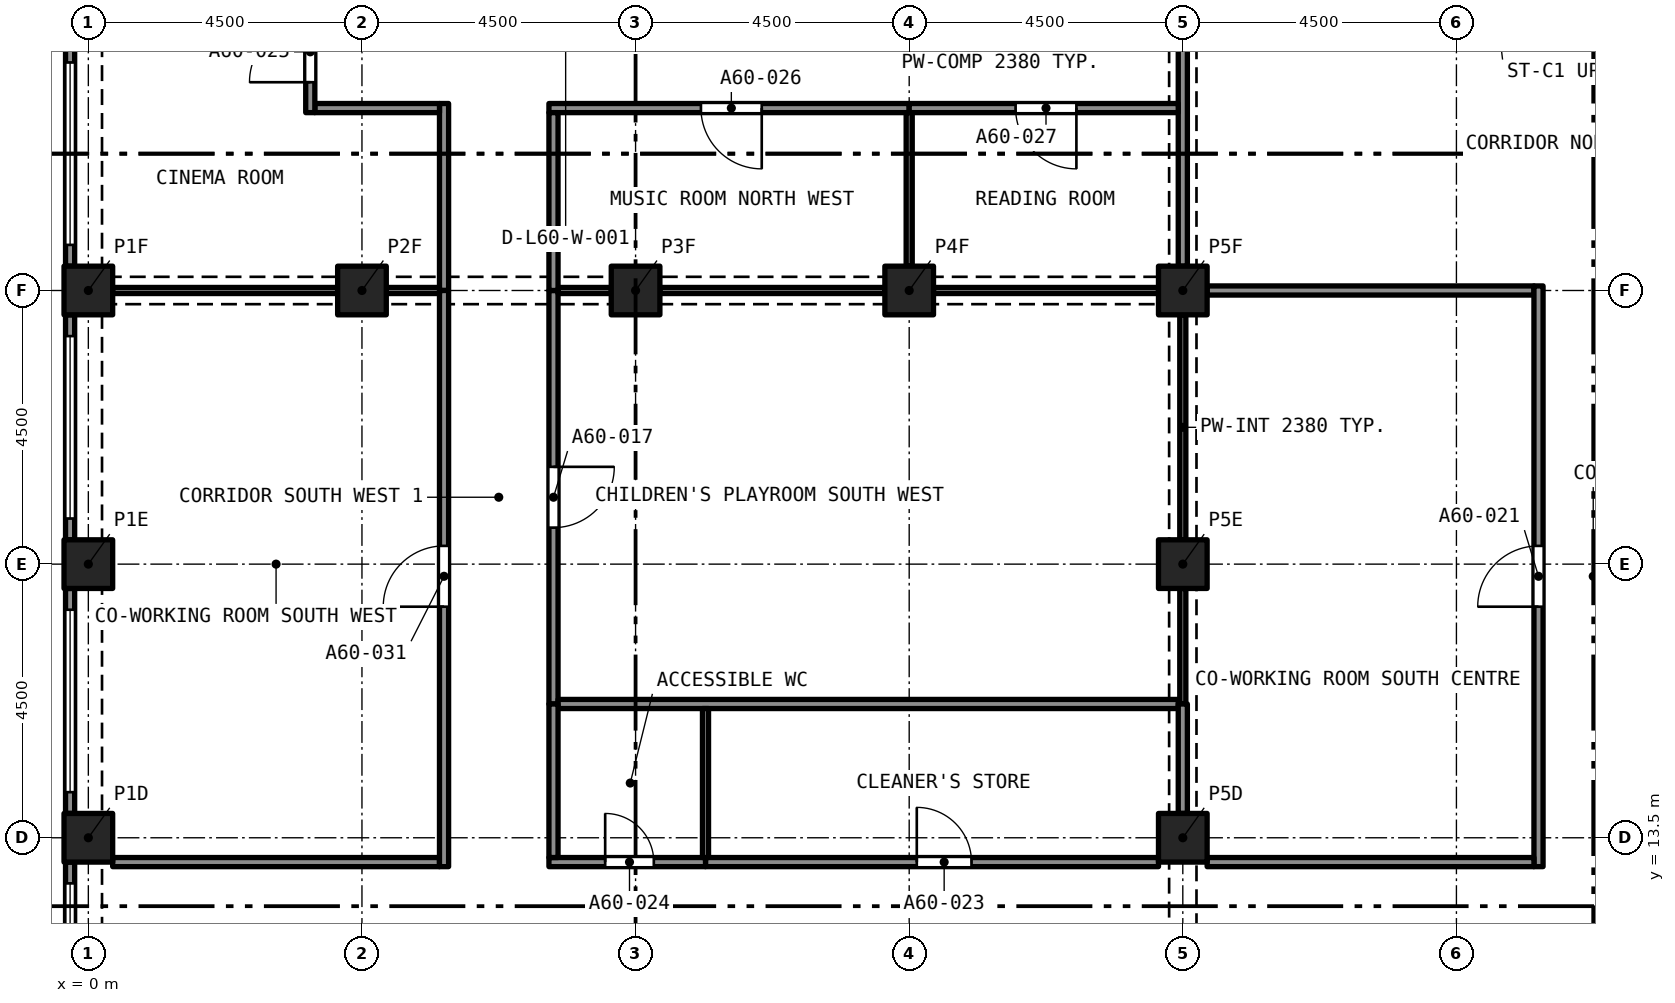
"""IFC4 building model, lengths in metres.
Left out: names, types, materials, properties, quantities, classifications, styles, units other than length and angle.
Written with IfcOpenShell. Run it as: python <this file> out.ifc"""

import sys

from ifc_helpers import new_model, si_unit, direction, frame, frame_2d, origin, origin_2d, place, context, subcontext, project, spatial, rectangle, extrude, element, fill, save


model = new_model("IFC4")
c1 = context("Model", 3, precision=1e-05, world=origin(), true_north=direction((0.0, 1.0)))
c2 = subcontext(c1, "Body", "Model", "MODEL_VIEW")
j1 = project(units=[si_unit("LENGTHUNIT", "METRE"), si_unit("PLANEANGLEUNIT", "RADIAN")], contexts=[c1])
p1 = place(None, origin())
s1 = spatial("IfcSite", under=j1, at=p1, CompositionType="ELEMENT")
p2 = place(p1, origin())
s2 = spatial("IfcBuilding", under=s1, at=p2, CompositionType="ELEMENT")
p3 = place(p2, frame((0.0, 0.0, 216.495)))
s3 = spatial("IfcBuildingStorey", under=s2, at=p3, CompositionType="ELEMENT", Elevation=216.495)
for number, where, z_axis, x_axis in (
    (1, (0.0, 13.5, 0.0), (0.0, 0.0, 1.0), (1.0, 0.0, 0.0)),
    (2, (18.0, 13.5, 0.0), (0.0, 0.0, 1.0), (1.0, 0.0, 0.0)),
    (3, (0.0, 18.0, 0.0), (0.0, 0.0, 1.0), (1.0, 0.0, 0.0)),
    (4, (18.0, 18.0, 0.0), (0.0, 0.0, 1.0), (1.0, 0.0, 0.0)),
    (5, (0.0, 22.5, 0.0), (0.0, 0.0, 1.0), (1.0, 0.0, 0.0)),
    (6, (4.5, 22.5, 0.0), (0.0, 0.0, 1.0), (1.0, 0.0, 0.0)),
    (7, (9.0, 22.5, 0.0), (0.0, 0.0, 1.0), (1.0, 0.0, 0.0)),
    (8, (13.5, 22.5, 0.0), (0.0, 0.0, 1.0), (1.0, 0.0, 0.0)),
    (9, (18.0, 22.5, 0.0), (0.0, 0.0, 1.0), (1.0, 0.0, 0.0)),
):
    element("IfcColumn", number, at=place(p3, frame(where, z_axis=z_axis, x_axis=x_axis)), inside=s3, PredefinedType="COLUMN", context=c2, shape_type="SweptSolid", body=[
        extrude(rectangle(XDim=0.8, YDim=0.8, at=origin_2d()), origin(), (0.0, 0.0, 1.0), 3.2),
    ])
p4 = place(p3, frame((-0.3, 22.9, 0.0), z_axis=(0.0, 0.0, 1.0), x_axis=(0.0, 1.0, 0.0)))
e10 = element("IfcWall", 10, at=p4, inside=s3, PredefinedType="SOLIDWALL", context=c2, shape_type="SweptSolid", body=[
    extrude(rectangle(XDim=3.7, YDim=0.15, at=frame_2d((1.85, 0.0))), origin(), (0.0, 0.0, 1.0), 3.2),
])
p5 = place(p4, frame((0.35, 0.0, 0.45)))
e11 = element("IfcOpeningElement", 11, at=p5, cuts=e10, PredefinedType="OPENING", context=c2, shape_type="SweptSolid", body=[
    extrude(rectangle(XDim=3.0, YDim=1.95, at=frame_2d((1.5, 0.975))), frame((0.0, 0.085, 0.0), z_axis=(0.0, -1.0, 0.0), x_axis=(1.0, 0.0, 0.0)), (0.0, 0.0, 1.0), 0.17),
])
p6 = place(p3, frame((-0.3, 18.4, 0.0), z_axis=(0.0, 0.0, 1.0), x_axis=(0.0, 1.0, 0.0)))
e12 = element("IfcWall", 12, at=p6, inside=s3, PredefinedType="SOLIDWALL", context=c2, shape_type="SweptSolid", body=[
    extrude(rectangle(XDim=3.7, YDim=0.15, at=frame_2d((1.85, 0.0))), origin(), (0.0, 0.0, 1.0), 3.2),
])
p7 = place(p6, frame((0.35, 0.0, 0.45)))
e13 = element("IfcOpeningElement", 13, at=p7, cuts=e12, PredefinedType="OPENING", context=c2, shape_type="SweptSolid", body=[
    extrude(rectangle(XDim=3.0, YDim=1.95, at=frame_2d((1.5, 0.975))), frame((0.0, 0.085, 0.0), z_axis=(0.0, -1.0, 0.0), x_axis=(1.0, 0.0, 0.0)), (0.0, 0.0, 1.0), 0.17),
])
p8 = place(p3, frame((-0.3, 13.9, 0.0), z_axis=(0.0, 0.0, 1.0), x_axis=(0.0, 1.0, 0.0)))
e14 = element("IfcWall", 14, at=p8, inside=s3, PredefinedType="SOLIDWALL", context=c2, shape_type="SweptSolid", body=[
    extrude(rectangle(XDim=3.7, YDim=0.15, at=frame_2d((1.85, 0.0))), origin(), (0.0, 0.0, 1.0), 3.2),
])
p9 = place(p8, frame((0.35, 0.0, 0.45)))
e15 = element("IfcOpeningElement", 15, at=p9, cuts=e14, PredefinedType="OPENING", context=c2, shape_type="SweptSolid", body=[
    extrude(rectangle(XDim=3.0, YDim=1.95, at=frame_2d((1.5, 0.975))), frame((0.0, 0.085, 0.0), z_axis=(0.0, -1.0, 0.0), x_axis=(1.0, 0.0, 0.0)), (0.0, 0.0, 1.0), 0.17),
])
p10 = place(p3, frame((-0.3, 9.4, 0.0), z_axis=(0.0, 0.0, 1.0), x_axis=(0.0, 1.0, 0.0)))
e16 = element("IfcWall", 16, at=p10, inside=s3, PredefinedType="SOLIDWALL", context=c2, shape_type="SweptSolid", body=[
    extrude(rectangle(XDim=3.7, YDim=0.15, at=frame_2d((1.85, 0.0))), origin(), (0.0, 0.0, 1.0), 3.2),
])
p11 = place(p10, frame((0.35, 0.0, 0.45)))
e17 = element("IfcOpeningElement", 17, at=p11, cuts=e16, PredefinedType="OPENING", context=c2, shape_type="SweptSolid", body=[
    extrude(rectangle(XDim=3.0, YDim=1.95, at=frame_2d((1.5, 0.975))), frame((0.0, 0.085, 0.0), z_axis=(0.0, -1.0, 0.0), x_axis=(1.0, 0.0, 0.0)), (0.0, 0.0, 1.0), 0.17),
])
p12 = place(p3, frame((18.0, 18.4, 0.0), z_axis=(0.0, 0.0, 1.0), x_axis=(0.0, 1.0, 0.0)))
e18 = element("IfcWall", 18, at=p12, inside=s3, PredefinedType="PARTITIONING", context=c2, shape_type="SweptSolid", body=[
    extrude(rectangle(XDim=3.7, YDim=0.1, at=frame_2d((1.85, 0.0))), origin(), (0.0, 0.0, 1.0), 2.38),
])
p13 = place(p3, frame((18.0, 15.7, 0.0), z_axis=(0.0, 0.0, 1.0), x_axis=(0.0, 1.0, 0.0)))
e19 = element("IfcWall", 19, at=p13, inside=s3, PredefinedType="PARTITIONING", context=c2, shape_type="SweptSolid", body=[
    extrude(rectangle(XDim=1.9, YDim=0.1, at=frame_2d((0.95, 0.0))), origin(), (0.0, 0.0, 1.0), 2.38),
])
p14 = place(p3, frame((7.65, 22.5, 0.0), z_axis=(0.0, 0.0, 1.0), x_axis=(0.0, -1.0, 0.0)))
e20 = element("IfcWall", 20, at=p14, inside=s3, PredefinedType="PARTITIONING", context=c2, shape_type="SweptSolid", body=[
    extrude(rectangle(XDim=6.8, YDim=0.15, at=frame_2d((3.4, 0.0))), origin(), (0.0, 0.0, 1.0), 2.9),
])
p15 = place(p14, frame((2.9, 0.0, 0.0)))
e21 = element("IfcOpeningElement", 21, at=p15, cuts=e20, PredefinedType="OPENING", context=c2, shape_type="SweptSolid", body=[
    extrude(rectangle(XDim=1.0, YDim=2.1, at=frame_2d((0.5, 1.05))), frame((0.0, 0.085, 0.0), z_axis=(0.0, -1.0, 0.0), x_axis=(1.0, 0.0, 0.0)), (0.0, 0.0, 1.0), 0.17),
])
p16 = place(p3, frame((7.725, 22.5, 0.0), z_axis=(0.0, 0.0, 1.0), x_axis=(1.0, 0.0, 0.0)))
e22 = element("IfcWall", 22, at=p16, inside=s3, PredefinedType="PARTITIONING", context=c2, shape_type="SweptSolid", body=[
    extrude(rectangle(XDim=0.875, YDim=0.1, at=frame_2d((0.438, 0.0))), origin(), (0.0, 0.0, 1.0), 2.38),
])
for number, where, z_axis, x_axis in (
    (23, (9.4, 22.5, 0.0), (0.0, 0.0, 1.0), (1.0, 0.0, 0.0)),
    (24, (13.9, 22.5, 0.0), (0.0, 0.0, 1.0), (1.0, 0.0, 0.0)),
):
    element("IfcWall", number, at=place(p3, frame(where, z_axis=z_axis, x_axis=x_axis)), inside=s3, PredefinedType="PARTITIONING", context=c2, shape_type="SweptSolid", body=[
        extrude(rectangle(XDim=3.7, YDim=0.1, at=frame_2d((1.85, 0.0))), origin(), (0.0, 0.0, 1.0), 2.38),
    ])
p17 = place(p3, frame((7.725, 15.7, 0.0), z_axis=(0.0, 0.0, 1.0), x_axis=(1.0, 0.0, 0.0)))
e25 = element("IfcWall", 25, at=p17, inside=s3, PredefinedType="PARTITIONING", context=c2, shape_type="SweptSolid", body=[
    extrude(rectangle(XDim=10.2, YDim=0.15, at=frame_2d((5.1, 0.0))), origin(), (0.0, 0.0, 1.0), 2.9),
])
p18 = place(p3, frame((18.4, 22.5, 0.0), z_axis=(0.0, 0.0, 1.0), x_axis=(1.0, 0.0, 0.0)))
e26 = element("IfcWall", 26, at=p18, inside=s3, PredefinedType="PARTITIONING", context=c2, shape_type="SweptSolid", body=[
    extrude(rectangle(XDim=5.375, YDim=0.15, at=frame_2d((2.688, 0.0))), origin(), (0.0, 0.0, 1.0), 2.75),
])
p19 = place(p3, frame((18.0, 22.9, 0.0), z_axis=(0.0, 0.0, 1.0), x_axis=(0.0, 1.0, 0.0)))
e27 = element("IfcWall", 27, at=p19, inside=s3, PredefinedType="PARTITIONING", context=c2, shape_type="SweptSolid", body=[
    extrude(rectangle(XDim=3.7, YDim=0.15, at=frame_2d((1.85, 0.0))), origin(), (0.0, 0.0, 1.0), 2.38),
])
p20 = place(p3, frame((23.85, 13.025, 0.0), z_axis=(0.0, 0.0, 1.0), x_axis=(0.0, 1.0, 0.0)))
e28 = element("IfcWall", 28, at=p20, inside=s3, PredefinedType="PARTITIONING", context=c2, shape_type="SweptSolid", body=[
    extrude(rectangle(XDim=9.55, YDim=0.15, at=frame_2d((4.775, 0.0))), origin(), (0.0, 0.0, 1.0), 2.75),
])
p21 = place(p20, frame((4.275, 0.0, 0.0)))
e29 = element("IfcOpeningElement", 29, at=p21, cuts=e28, PredefinedType="OPENING", context=c2, shape_type="SweptSolid", body=[
    extrude(rectangle(XDim=1.0, YDim=2.1, at=frame_2d((0.5, 1.05))), frame((0.0, 0.085, 0.0), z_axis=(0.0, -1.0, 0.0), x_axis=(1.0, 0.0, 0.0)), (0.0, 0.0, 1.0), 0.17),
])
p22 = place(p3, frame((18.4, 13.1, 0.0), z_axis=(0.0, 0.0, 1.0), x_axis=(1.0, 0.0, 0.0)))
e30 = element("IfcWall", 30, at=p22, inside=s3, PredefinedType="PARTITIONING", context=c2, shape_type="SweptSolid", body=[
    extrude(rectangle(XDim=5.375, YDim=0.15, at=frame_2d((2.688, 0.0))), origin(), (0.0, 0.0, 1.0), 2.75),
])
p23 = place(p3, frame((10.15, 13.1, 0.0), z_axis=(0.0, 0.0, 1.0), x_axis=(1.0, 0.0, 0.0)))
e31 = element("IfcWall", 31, at=p23, inside=s3, PredefinedType="PARTITIONING", context=c2, shape_type="SweptSolid", body=[
    extrude(rectangle(XDim=7.45, YDim=0.15, at=frame_2d((3.725, 0.0))), origin(), (0.0, 0.0, 1.0), 2.9),
])
p24 = place(p23, frame((3.475, 0.0, 0.0)))
e32 = element("IfcOpeningElement", 32, at=p24, cuts=e31, PredefinedType="OPENING", context=c2, shape_type="SweptSolid", body=[
    extrude(rectangle(XDim=0.9, YDim=2.1, at=frame_2d((0.45, 1.05))), frame((0.0, 0.085, 0.0), z_axis=(0.0, -1.0, 0.0), x_axis=(1.0, 0.0, 0.0)), (0.0, 0.0, 1.0), 0.17),
])
p25 = place(p3, frame((7.575, 13.1, 0.0), z_axis=(0.0, 0.0, 1.0), x_axis=(1.0, 0.0, 0.0)))
e33 = element("IfcWall", 33, at=p25, inside=s3, PredefinedType="PARTITIONING", context=c2, shape_type="SweptSolid", body=[
    extrude(rectangle(XDim=2.575, YDim=0.15, at=frame_2d((1.288, 0.0))), origin(), (0.0, 0.0, 1.0), 2.9),
])
p26 = place(p25, frame((0.925, 0.0, 0.0)))
e34 = element("IfcOpeningElement", 34, at=p26, cuts=e33, PredefinedType="OPENING", context=c2, shape_type="SweptSolid", body=[
    extrude(rectangle(XDim=0.8, YDim=2.1, at=frame_2d((0.4, 1.05))), frame((0.0, 0.085, 0.0), z_axis=(0.0, -1.0, 0.0), x_axis=(1.0, 0.0, 0.0)), (0.0, 0.0, 1.0), 0.17),
])
p27 = place(p3, frame((0.4, 13.1, 0.0), z_axis=(0.0, 0.0, 1.0), x_axis=(1.0, 0.0, 0.0)))
e35 = element("IfcWall", 35, at=p27, inside=s3, PredefinedType="PARTITIONING", context=c2, shape_type="SweptSolid", body=[
    extrude(rectangle(XDim=5.375, YDim=0.15, at=frame_2d((2.688, 0.0))), origin(), (0.0, 0.0, 1.0), 2.9),
])
p28 = place(p3, frame((18.0, 13.9, 0.0), z_axis=(0.0, 0.0, 1.0), x_axis=(0.0, 1.0, 0.0)))
e36 = element("IfcWall", 36, at=p28, inside=s3, PredefinedType="PARTITIONING", context=c2, shape_type="SweptSolid", body=[
    extrude(rectangle(XDim=1.8, YDim=0.15, at=frame_2d((0.9, 0.0))), origin(), (0.0, 0.0, 1.0), 2.38),
])
p29 = place(p3, frame((5.85, 22.5, 0.0), z_axis=(0.0, 0.0, 1.0), x_axis=(0.0, 1.0, 0.0)))
e37 = element("IfcWall", 37, at=p29, inside=s3, PredefinedType="PARTITIONING", context=c2, shape_type="SweptSolid", body=[
    extrude(rectangle(XDim=3.075, YDim=0.15, at=frame_2d((1.538, 0.0))), origin(), (0.0, 0.0, 1.0), 2.9),
])
p30 = place(p3, frame((3.725, 25.5, 0.0), z_axis=(0.0, 0.0, 1.0), x_axis=(1.0, 0.0, 0.0)))
e38 = element("IfcWall", 38, at=p30, inside=s3, PredefinedType="PARTITIONING", context=c2, shape_type="SweptSolid", body=[
    extrude(rectangle(XDim=2.05, YDim=0.15, at=frame_2d((1.025, 0.0))), origin(), (0.0, 0.0, 1.0), 2.9),
])
p31 = place(p3, frame((3.65, 25.425, 0.0), z_axis=(0.0, 0.0, 1.0), x_axis=(0.0, 1.0, 0.0)))
e39 = element("IfcWall", 39, at=p31, inside=s3, PredefinedType="PARTITIONING", context=c2, shape_type="SweptSolid", body=[
    extrude(rectangle(XDim=1.925, YDim=0.15, at=frame_2d((0.962, 0.0))), origin(), (0.0, 0.0, 1.0), 2.9),
])
p32 = place(p31, frame((0.5, 0.0, 0.0)))
e40 = element("IfcOpeningElement", 40, at=p32, cuts=e39, PredefinedType="OPENING", context=c2, shape_type="SweptSolid", body=[
    extrude(rectangle(XDim=1.0, YDim=2.1, at=frame_2d((0.5, 1.05))), frame((0.0, 0.085, 0.0), z_axis=(0.0, -1.0, 0.0), x_axis=(1.0, 0.0, 0.0)), (0.0, 0.0, 1.0), 0.17),
])
p33 = place(p3, frame((13.5, 25.5, 0.0), z_axis=(0.0, 0.0, 1.0), x_axis=(-1.0, 0.0, 0.0)))
e41 = element("IfcWall", 41, at=p33, inside=s3, PredefinedType="PARTITIONING", context=c2, shape_type="SweptSolid", body=[
    extrude(rectangle(XDim=5.925, YDim=0.15, at=frame_2d((2.962, 0.0))), origin(), (0.0, 0.0, 1.0), 2.9),
])
p34 = place(p33, frame((2.425, 0.0, 0.0)))
e42 = element("IfcOpeningElement", 42, at=p34, cuts=e41, PredefinedType="OPENING", context=c2, shape_type="SweptSolid", body=[
    extrude(rectangle(XDim=1.0, YDim=2.1, at=frame_2d((0.5, 1.05))), frame((0.0, 0.085, 0.0), z_axis=(0.0, -1.0, 0.0), x_axis=(1.0, 0.0, 0.0)), (0.0, 0.0, 1.0), 0.17),
])
p35 = place(p3, frame((7.65, 22.5, 0.0), z_axis=(0.0, 0.0, 1.0), x_axis=(0.0, 1.0, 0.0)))
e43 = element("IfcWall", 43, at=p35, inside=s3, PredefinedType="PARTITIONING", context=c2, shape_type="SweptSolid", body=[
    extrude(rectangle(XDim=2.925, YDim=0.15, at=frame_2d((1.462, 0.0))), origin(), (0.0, 0.0, 1.0), 2.9),
])
p36 = place(p3, frame((17.925, 25.5, 0.0), z_axis=(0.0, 0.0, 1.0), x_axis=(-1.0, 0.0, 0.0)))
e44 = element("IfcWall", 44, at=p36, inside=s3, PredefinedType="PARTITIONING", context=c2, shape_type="SweptSolid", body=[
    extrude(rectangle(XDim=4.425, YDim=0.15, at=frame_2d((2.212, 0.0))), origin(), (0.0, 0.0, 1.0), 2.9),
])
p37 = place(p36, frame((1.675, 0.0, 0.0)))
e45 = element("IfcOpeningElement", 45, at=p37, cuts=e44, PredefinedType="OPENING", context=c2, shape_type="SweptSolid", body=[
    extrude(rectangle(XDim=1.0, YDim=2.1, at=frame_2d((0.5, 1.05))), frame((0.0, 0.085, 0.0), z_axis=(0.0, -1.0, 0.0), x_axis=(1.0, 0.0, 0.0)), (0.0, 0.0, 1.0), 0.17),
])
p38 = place(p3, frame((7.65, 13.175, 0.0), z_axis=(0.0, 0.0, 1.0), x_axis=(0.0, 1.0, 0.0)))
e46 = element("IfcWall", 46, at=p38, inside=s3, PredefinedType="PARTITIONING", context=c2, shape_type="SweptSolid", body=[
    extrude(rectangle(XDim=2.525, YDim=0.15, at=frame_2d((1.262, 0.0))), origin(), (0.0, 0.0, 1.0), 2.9),
])
p39 = place(p3, frame((5.85, 13.025, 0.0), z_axis=(0.0, 0.0, 1.0), x_axis=(0.0, 1.0, 0.0)))
e47 = element("IfcWall", 47, at=p39, inside=s3, PredefinedType="PARTITIONING", context=c2, shape_type="SweptSolid", body=[
    extrude(rectangle(XDim=9.475, YDim=0.15, at=frame_2d((4.738, 0.0))), origin(), (0.0, 0.0, 1.0), 2.9),
])
p40 = place(p39, frame((4.275, 0.0, 0.0)))
e48 = element("IfcOpeningElement", 48, at=p40, cuts=e47, PredefinedType="OPENING", context=c2, shape_type="SweptSolid", body=[
    extrude(rectangle(XDim=1.0, YDim=2.1, at=frame_2d((0.5, 1.05))), frame((0.0, 0.085, 0.0), z_axis=(0.0, -1.0, 0.0), x_axis=(1.0, 0.0, 0.0)), (0.0, 0.0, 1.0), 0.17),
])
p41 = place(p3, frame((4.9, 22.5, 0.0), z_axis=(0.0, 0.0, 1.0), x_axis=(1.0, 0.0, 0.0)))
e49 = element("IfcWall", 49, at=p41, inside=s3, PredefinedType="PARTITIONING", context=c2, shape_type="SweptSolid", body=[
    extrude(rectangle(XDim=0.875, YDim=0.1, at=frame_2d((0.438, 0.0))), origin(), (0.0, 0.0, 1.0), 2.38),
])
p42 = place(p3, frame((0.4, 22.5, 0.0), z_axis=(0.0, 0.0, 1.0), x_axis=(1.0, 0.0, 0.0)))
e50 = element("IfcWall", 50, at=p42, inside=s3, PredefinedType="PARTITIONING", context=c2, shape_type="SweptSolid", body=[
    extrude(rectangle(XDim=3.7, YDim=0.1, at=frame_2d((1.85, 0.0))), origin(), (0.0, 0.0, 1.0), 2.38),
])
p43 = place(p3, frame((13.5, 22.9, 0.0), z_axis=(0.0, 0.0, 1.0), x_axis=(0.0, 1.0, 0.0)))
e51 = element("IfcWall", 51, at=p43, inside=s3, PredefinedType="PARTITIONING", context=c2, shape_type="SweptSolid", body=[
    extrude(rectangle(XDim=2.525, YDim=0.1, at=frame_2d((1.263, 0.0))), origin(), (0.0, 0.0, 1.0), 2.9),
])
p44 = place(p3, frame((10.15, 13.175, 0.0), z_axis=(0.0, 0.0, 1.0), x_axis=(0.0, 1.0, 0.0)))
e52 = element("IfcWall", 52, at=p44, inside=s3, PredefinedType="PARTITIONING", context=c2, shape_type="SweptSolid", body=[
    extrude(rectangle(XDim=2.45, YDim=0.1, at=frame_2d((1.225, 0.0))), origin(), (0.0, 0.0, 1.0), 2.9),
])
p45 = place(p5, origin())
e53 = element("IfcWindow", 53, at=p45, inside=s3, PartitioningType="SINGLE_PANEL", PredefinedType="WINDOW", context=c2, shape_type="SweptSolid", body=[
    extrude(rectangle(XDim=3.0, YDim=1.95, at=frame_2d((1.5, 0.975))), frame((0.0, 0.03, 0.0), z_axis=(0.0, -1.0, 0.0), x_axis=(1.0, 0.0, 0.0)), (0.0, 0.0, 1.0), 0.06),
])
fill(e11, e53)
p46 = place(p7, origin())
e54 = element("IfcWindow", 54, at=p46, inside=s3, PartitioningType="SINGLE_PANEL", PredefinedType="WINDOW", context=c2, shape_type="SweptSolid", body=[
    extrude(rectangle(XDim=3.0, YDim=1.95, at=frame_2d((1.5, 0.975))), frame((0.0, 0.03, 0.0), z_axis=(0.0, -1.0, 0.0), x_axis=(1.0, 0.0, 0.0)), (0.0, 0.0, 1.0), 0.06),
])
fill(e13, e54)
p47 = place(p9, origin())
e55 = element("IfcWindow", 55, at=p47, inside=s3, PartitioningType="SINGLE_PANEL", PredefinedType="WINDOW", context=c2, shape_type="SweptSolid", body=[
    extrude(rectangle(XDim=3.0, YDim=1.95, at=frame_2d((1.5, 0.975))), frame((0.0, 0.03, 0.0), z_axis=(0.0, -1.0, 0.0), x_axis=(1.0, 0.0, 0.0)), (0.0, 0.0, 1.0), 0.06),
])
fill(e15, e55)
p48 = place(p11, origin())
e56 = element("IfcWindow", 56, at=p48, inside=s3, PartitioningType="SINGLE_PANEL", PredefinedType="WINDOW", context=c2, shape_type="SweptSolid", body=[
    extrude(rectangle(XDim=3.0, YDim=1.95, at=frame_2d((1.5, 0.975))), frame((0.0, 0.03, 0.0), z_axis=(0.0, -1.0, 0.0), x_axis=(1.0, 0.0, 0.0)), (0.0, 0.0, 1.0), 0.06),
])
fill(e17, e56)
p49 = place(p15, origin())
e57 = element("IfcDoor", 57, at=p49, inside=s3, OperationType="SINGLE_SWING_LEFT", PredefinedType="DOOR", context=c2, shape_type="SweptSolid", body=[
    extrude(rectangle(XDim=1.0, YDim=2.1, at=frame_2d((0.5, 1.05))), frame((0.0, 0.025, 0.0), z_axis=(0.0, -1.0, 0.0), x_axis=(1.0, 0.0, 0.0)), (0.0, 0.0, 1.0), 0.05),
])
fill(e21, e57)
p50 = place(p21, origin())
e58 = element("IfcDoor", 58, at=p50, inside=s3, OperationType="SINGLE_SWING_RIGHT", PredefinedType="DOOR", context=c2, shape_type="SweptSolid", body=[
    extrude(rectangle(XDim=1.0, YDim=2.1, at=frame_2d((0.5, 1.05))), frame((0.0, 0.025, 0.0), z_axis=(0.0, -1.0, 0.0), x_axis=(1.0, 0.0, 0.0)), (0.0, 0.0, 1.0), 0.05),
])
fill(e29, e58)
p51 = place(p24, origin())
e59 = element("IfcDoor", 59, at=p51, inside=s3, OperationType="SINGLE_SWING_RIGHT", PredefinedType="DOOR", context=c2, shape_type="SweptSolid", body=[
    extrude(rectangle(XDim=0.9, YDim=2.1, at=frame_2d((0.45, 1.05))), frame((0.0, 0.025, 0.0), z_axis=(0.0, -1.0, 0.0), x_axis=(1.0, 0.0, 0.0)), (0.0, 0.0, 1.0), 0.05),
])
fill(e32, e59)
p52 = place(p26, origin())
e60 = element("IfcDoor", 60, at=p52, inside=s3, OperationType="SINGLE_SWING_RIGHT", PredefinedType="DOOR", context=c2, shape_type="SweptSolid", body=[
    extrude(rectangle(XDim=0.8, YDim=2.1, at=frame_2d((0.4, 1.05))), frame((0.0, 0.025, 0.0), z_axis=(0.0, -1.0, 0.0), x_axis=(1.0, 0.0, 0.0)), (0.0, 0.0, 1.0), 0.05),
])
fill(e34, e60)
p53 = place(p32, origin())
e61 = element("IfcDoor", 61, at=p53, inside=s3, OperationType="SINGLE_SWING_RIGHT", PredefinedType="DOOR", context=c2, shape_type="SweptSolid", body=[
    extrude(rectangle(XDim=1.0, YDim=2.1, at=frame_2d((0.5, 1.05))), frame((0.0, 0.025, 0.0), z_axis=(0.0, -1.0, 0.0), x_axis=(1.0, 0.0, 0.0)), (0.0, 0.0, 1.0), 0.05),
])
fill(e40, e61)
p54 = place(p34, origin())
e62 = element("IfcDoor", 62, at=p54, inside=s3, OperationType="SINGLE_SWING_LEFT", PredefinedType="DOOR", context=c2, shape_type="SweptSolid", body=[
    extrude(rectangle(XDim=1.0, YDim=2.1, at=frame_2d((0.5, 1.05))), frame((0.0, 0.025, 0.0), z_axis=(0.0, -1.0, 0.0), x_axis=(1.0, 0.0, 0.0)), (0.0, 0.0, 1.0), 0.05),
])
fill(e42, e62)
p55 = place(p37, origin())
e63 = element("IfcDoor", 63, at=p55, inside=s3, OperationType="SINGLE_SWING_LEFT", PredefinedType="DOOR", context=c2, shape_type="SweptSolid", body=[
    extrude(rectangle(XDim=1.0, YDim=2.1, at=frame_2d((0.5, 1.05))), frame((0.0, 0.025, 0.0), z_axis=(0.0, -1.0, 0.0), x_axis=(1.0, 0.0, 0.0)), (0.0, 0.0, 1.0), 0.05),
])
fill(e45, e63)
p56 = place(p40, origin())
e64 = element("IfcDoor", 64, at=p56, inside=s3, OperationType="SINGLE_SWING_RIGHT", PredefinedType="DOOR", context=c2, shape_type="SweptSolid", body=[
    extrude(rectangle(XDim=1.0, YDim=2.1, at=frame_2d((0.5, 1.05))), frame((0.0, 0.025, 0.0), z_axis=(0.0, -1.0, 0.0), x_axis=(1.0, 0.0, 0.0)), (0.0, 0.0, 1.0), 0.05),
])
fill(e48, e64)
save(model, sys.argv[1])
